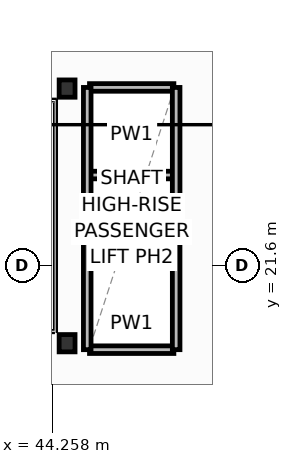
"""IFC4 building model, lengths in metres.
Left out: names, types, materials, properties, quantities, classifications, styles, units other than length and angle.
Written with IfcOpenShell. Run it as: python <this file> out.ifc"""

import sys

from ifc_helpers import new_model, si_unit, direction, frame, frame_2d, origin, origin_2d, place, context, subcontext, project, spatial, rectangle, i_section, extrude, element, save


model = new_model("IFC4")
c1 = context("Model", 3, precision=1e-05, world=origin(), true_north=direction((0.0, 1.0)))
c2 = subcontext(c1, "Body", "Model", "MODEL_VIEW")
j1 = project(units=[si_unit("LENGTHUNIT", "METRE"), si_unit("PLANEANGLEUNIT", "RADIAN")], contexts=[c1])
p1 = place(None, origin())
s1 = spatial("IfcSite", under=j1, at=p1, CompositionType="ELEMENT")
p2 = place(p1, origin())
s2 = spatial("IfcBuilding", under=s1, at=p2, CompositionType="ELEMENT")
p3 = place(p2, frame((0.0, 0.0, 200.5)))
s3 = spatial("IfcBuildingStorey", under=s2, at=p3, CompositionType="ELEMENT", Elevation=200.5)
for number, where, z_axis, x_axis in (
    (1, (44.65, 19.55, 0.0), (0.0, 0.0, 1.0), (1.0, 0.0, 0.0)),
    (2, (44.65, 26.25, 0.0), (0.0, 0.0, 1.0), (1.0, 0.0, 0.0)),
):
    element("IfcColumn", number, at=place(p3, frame(where, z_axis=z_axis, x_axis=x_axis)), inside=s3, PredefinedType="COLUMN", context=c2, shape_type="SweptSolid", body=[
        extrude(i_section(OverallWidth=0.418, OverallDepth=0.455, WebThickness=0.042, FlangeThickness=0.068, FilletRadius=0.025, at=origin_2d()), origin(), (0.0, 0.0, 1.0), 3.7),
    ])
for number, where, z_axis, x_axis in (
    (3, (45.24, 21.675, 0.0), (0.0, 0.0, 1.0), (1.0, 0.0, 0.0)),
    (4, (45.24, 23.975, 0.0), (0.0, 0.0, 1.0), (1.0, 0.0, 0.0)),
):
    element("IfcWall", number, at=place(p3, frame(where, z_axis=z_axis, x_axis=x_axis)), inside=s3, PredefinedType="PARTITIONING", context=c2, shape_type="SweptSolid", body=[
        extrude(rectangle(XDim=2.22, YDim=0.2, at=frame_2d((1.11, 0.0))), origin(), (0.0, 0.0, 1.0), 3.45),
    ])
p4 = place(p3, frame((45.24, 19.38, 0.0), z_axis=(0.0, 0.0, 1.0), x_axis=(1.0, 0.0, 0.0)))
e5 = element("IfcWall", 5, at=p4, inside=s3, PredefinedType="PARTITIONING", context=c2, shape_type="SweptSolid", body=[
    extrude(rectangle(XDim=2.22, YDim=0.2, at=frame_2d((1.11, 0.0))), origin(), (0.0, 0.0, 1.0), 2.662),
])
p5 = place(p3, frame((45.24, 26.28, 0.0), z_axis=(0.0, 0.0, 1.0), x_axis=(1.0, 0.0, 0.0)))
e6 = element("IfcWall", 6, at=p5, inside=s3, PredefinedType="PARTITIONING", context=c2, shape_type="SweptSolid", body=[
    extrude(rectangle(XDim=2.22, YDim=0.2, at=frame_2d((1.11, 0.0))), origin(), (0.0, 0.0, 1.0), 3.45),
])
for number, where, z_axis, x_axis in (
    (7, (45.18, 19.38, 0.0), (0.0, 0.0, 1.0), (0.0, 1.0, 0.0)),
    (8, (47.52, 19.38, 0.0), (0.0, 0.0, 1.0), (0.0, 1.0, 0.0)),
):
    element("IfcWall", number, at=place(p3, frame(where, z_axis=z_axis, x_axis=x_axis)), inside=s3, PredefinedType="PARTITIONING", context=c2, shape_type="SweptSolid", body=[
        extrude(rectangle(XDim=6.9, YDim=0.2, at=frame_2d((3.45, 0.0))), origin(), (0.0, 0.0, 1.0), 3.45),
    ])
save(model, sys.argv[1])
